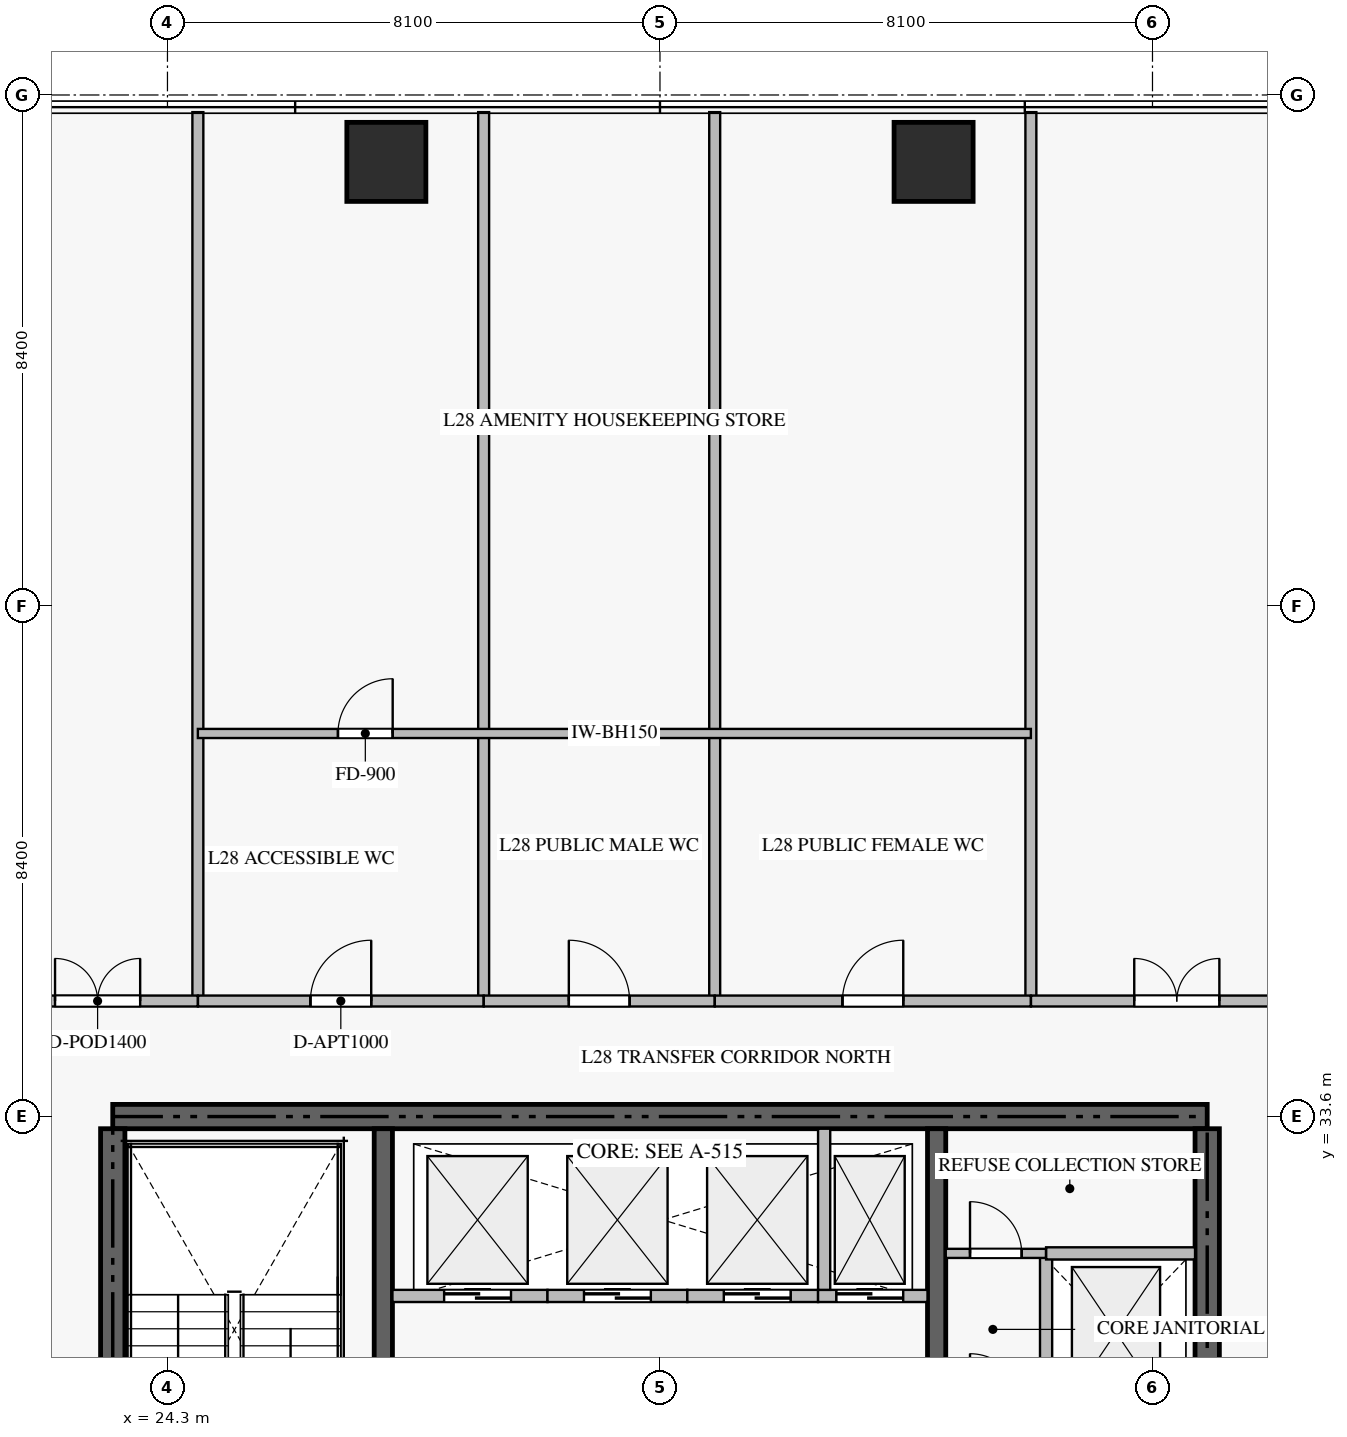
"""IFC4 building model, lengths in metres.
Left out: names, types, materials, properties, quantities, classifications, styles, units other than length and angle.
Written with IfcOpenShell. Run it as: python <this file> out.ifc"""

import sys

from ifc_helpers import new_model, si_unit, direction, frame, frame_2d, origin, origin_2d, place, context, subcontext, project, spatial, rectangle, extrude, source, transform, mapped, element, fill, save


model = new_model("IFC4")
c1 = context("Model", 3, precision=1e-05, world=origin(), true_north=direction((0.0, 1.0)))
c2 = subcontext(c1, "Body", "Model", "MODEL_VIEW")
j1 = project(units=[si_unit("LENGTHUNIT", "METRE"), si_unit("PLANEANGLEUNIT", "RADIAN")], contexts=[c1])
p1 = place(None, origin())
s1 = spatial("IfcSite", under=j1, at=p1, CompositionType="ELEMENT")
p2 = place(p1, origin())
s2 = spatial("IfcBuilding", under=s1, at=p2, CompositionType="ELEMENT")
p3 = place(p2, frame((0.0, 0.0, 115.2)))
s3 = spatial("IfcBuildingStorey", under=s2, at=p3, CompositionType="ELEMENT", Elevation=115.2)
p4 = place(p3, frame((41.4, 33.6, -0.36), z_axis=(0.0, 0.0, 1.0), x_axis=(-1.0, 0.0, 0.0)))
e1 = element("IfcWall", 1, at=p4, inside=s3, PredefinedType="SHEAR", context=c2, shape_type="SweptSolid", body=[
    extrude(rectangle(XDim=18.0, YDim=0.4, at=frame_2d((9.0, 0.0))), origin(), (0.0, 0.0, 1.0), 4.868),
])
p5 = place(p3, frame((23.4, 24.25, -0.36), z_axis=(0.0, 0.0, 1.0), x_axis=(0.0, 1.0, 0.0)))
e2 = element("IfcWall", 2, at=p5, inside=s3, PredefinedType="SHEAR", context=c2, shape_type="SweptSolid", body=[
    extrude(rectangle(XDim=9.15, YDim=0.4, at=frame_2d((4.575, 0.0))), origin(), (0.0, 0.0, 1.0), 4.868),
])
p6 = place(p3, frame((41.4, 27.75, -0.36), z_axis=(0.0, 0.0, 1.0), x_axis=(0.0, 1.0, 0.0)))
e3 = element("IfcWall", 3, at=p6, inside=s3, PredefinedType="SHEAR", context=c2, shape_type="SweptSolid", body=[
    extrude(rectangle(XDim=5.65, YDim=0.4, at=frame_2d((2.825, 0.0))), origin(), (0.0, 0.0, 1.0), 4.868),
])
p7 = place(p3, frame((27.85, 23.55, -0.36), z_axis=(0.0, 0.0, 1.0), x_axis=(0.0, 1.0, 0.0)))
e4 = element("IfcWall", 4, at=p7, inside=s3, PredefinedType="SHEAR", context=c2, shape_type="SweptSolid", body=[
    extrude(rectangle(XDim=9.85, YDim=0.3, at=frame_2d((4.925, 0.0))), origin(), (0.0, 0.0, 1.0), 4.868),
])
p8 = place(p3, frame((36.95, 27.05, -0.36), z_axis=(0.0, 0.0, 1.0), x_axis=(0.0, 1.0, 0.0)))
e5 = element("IfcWall", 5, at=p8, inside=s3, PredefinedType="SHEAR", context=c2, shape_type="SweptSolid", body=[
    extrude(rectangle(XDim=6.35, YDim=0.3, at=frame_2d((3.175, 0.0))), origin(), (0.0, 0.0, 1.0), 4.868),
])
m1 = source(origin(), c2, "Body", "SweptSolid", [
    extrude(rectangle(XDim=1.3, YDim=1.3, at=origin_2d()), origin(), (0.0, 0.0, 1.0), 4.87),
])
for number, where, z_axis, x_axis in (
    (6, (27.9, 49.3, -0.36), (0.0, 0.0, 1.0), (1.0, 0.0, 0.0)),
    (7, (36.9, 49.3, -0.36), (0.0, 0.0, 1.0), (1.0, 0.0, 0.0)),
):
    element("IfcColumn", number, at=place(p3, frame(where, z_axis=z_axis, x_axis=x_axis)), inside=s3, PredefinedType="COLUMN", context=c2, shape_type="MappedRepresentation", body=[
        mapped(m1, transform((0.0, 0.0, 0.0), scale=1.0)),
    ])
p9 = place(p3, frame((28.0, 30.65, 0.0), z_axis=(0.0, 0.0, 1.0), x_axis=(1.0, 0.0, 0.0)))
e8 = element("IfcWall", 8, at=p9, inside=s3, PredefinedType="STANDARD", context=c2, shape_type="SweptSolid", body=[
    extrude(rectangle(XDim=2.55, YDim=0.2, at=frame_2d((1.275, 0.0))), origin(), (0.0, 0.0, 1.0), 4.51),
])
p10 = place(p9, frame((0.85, 0.0, 0.0)))
e9 = element("IfcOpeningElement", 9, at=p10, cuts=e8, PredefinedType="OPENING", context=c2, shape_type="SweptSolid", body=[
    extrude(rectangle(XDim=1.1, YDim=2.2, at=frame_2d((0.55, 1.1))), frame((0.0, 0.11, 0.0), z_axis=(0.0, -1.0, 0.0), x_axis=(1.0, 0.0, 0.0)), (0.0, 0.0, 1.0), 0.22),
])
p11 = place(p3, frame((30.55, 30.65, 0.0), z_axis=(0.0, 0.0, 1.0), x_axis=(1.0, 0.0, 0.0)))
e10 = element("IfcWall", 10, at=p11, inside=s3, PredefinedType="STANDARD", context=c2, shape_type="SweptSolid", body=[
    extrude(rectangle(XDim=2.3, YDim=0.2, at=frame_2d((1.15, 0.0))), origin(), (0.0, 0.0, 1.0), 4.51),
])
p12 = place(p11, frame((0.6, 0.0, 0.0)))
e11 = element("IfcOpeningElement", 11, at=p12, cuts=e10, PredefinedType="OPENING", context=c2, shape_type="SweptSolid", body=[
    extrude(rectangle(XDim=1.1, YDim=2.2, at=frame_2d((0.55, 1.1))), frame((0.0, 0.11, 0.0), z_axis=(0.0, -1.0, 0.0), x_axis=(1.0, 0.0, 0.0)), (0.0, 0.0, 1.0), 0.22),
])
p13 = place(p3, frame((32.85, 30.65, 0.0), z_axis=(0.0, 0.0, 1.0), x_axis=(1.0, 0.0, 0.0)))
e12 = element("IfcWall", 12, at=p13, inside=s3, PredefinedType="STANDARD", context=c2, shape_type="SweptSolid", body=[
    extrude(rectangle(XDim=2.15, YDim=0.2, at=frame_2d((1.075, 0.0))), origin(), (0.0, 0.0, 1.0), 4.51),
])
p14 = place(p13, frame((0.6, 0.0, 0.0)))
e13 = element("IfcOpeningElement", 13, at=p14, cuts=e12, PredefinedType="OPENING", context=c2, shape_type="SweptSolid", body=[
    extrude(rectangle(XDim=1.1, YDim=2.2, at=frame_2d((0.55, 1.1))), frame((0.0, 0.11, 0.0), z_axis=(0.0, -1.0, 0.0), x_axis=(1.0, 0.0, 0.0)), (0.0, 0.0, 1.0), 0.22),
])
p15 = place(p3, frame((35.0, 30.65, 0.0), z_axis=(0.0, 0.0, 1.0), x_axis=(1.0, 0.0, 0.0)))
e14 = element("IfcWall", 14, at=p15, inside=s3, PredefinedType="STANDARD", context=c2, shape_type="SweptSolid", body=[
    extrude(rectangle(XDim=1.8, YDim=0.2, at=frame_2d((0.9, 0.0))), origin(), (0.0, 0.0, 1.0), 4.51),
])
p16 = place(p15, frame((0.3, 0.0, 0.0)))
e15 = element("IfcOpeningElement", 15, at=p16, cuts=e14, PredefinedType="OPENING", context=c2, shape_type="SweptSolid", body=[
    extrude(rectangle(XDim=1.1, YDim=2.2, at=frame_2d((0.55, 1.1))), frame((0.0, 0.11, 0.0), z_axis=(0.0, -1.0, 0.0), x_axis=(1.0, 0.0, 0.0)), (0.0, 0.0, 1.0), 0.22),
])
p17 = place(p3, frame((35.1, 30.75, 0.0), z_axis=(0.0, 0.0, 1.0), x_axis=(0.0, 1.0, 0.0)))
e16 = element("IfcWall", 16, at=p17, inside=s3, PredefinedType="STANDARD", context=c2, shape_type="SweptSolid", body=[
    extrude(rectangle(XDim=2.65, YDim=0.2, at=frame_2d((1.325, 0.0))), origin(), (0.0, 0.0, 1.0), 4.51),
])
p18 = place(p3, frame((38.75, 28.85, 0.0), z_axis=(0.0, 0.0, 1.0), x_axis=(0.0, 1.0, 0.0)))
e17 = element("IfcWall", 17, at=p18, inside=s3, PredefinedType="STANDARD", context=c2, shape_type="SweptSolid", body=[
    extrude(rectangle(XDim=2.5, YDim=0.2, at=frame_2d((1.25, 0.0))), origin(), (0.0, 0.0, 1.0), 4.51),
])
p19 = place(p3, frame((38.75, 31.35, 0.0), z_axis=(0.0, 0.0, 1.0), x_axis=(1.0, 0.0, 0.0)))
e18 = element("IfcWall", 18, at=p19, inside=s3, PredefinedType="STANDARD", context=c2, shape_type="SweptSolid", body=[
    extrude(rectangle(XDim=2.45, YDim=0.2, at=frame_2d((1.225, 0.0))), origin(), (0.0, 0.0, 1.0), 4.51),
])
p20 = place(p3, frame((37.1, 31.35, 0.0), z_axis=(0.0, 0.0, 1.0), x_axis=(1.0, 0.0, 0.0)))
e19 = element("IfcWall", 19, at=p20, inside=s3, PredefinedType="PARTITIONING", context=c2, shape_type="SweptSolid", body=[
    extrude(rectangle(XDim=1.648, YDim=0.15, at=frame_2d((0.824, 0.0))), origin(), (0.0, 0.0, 1.0), 4.51),
])
p21 = place(p20, frame((0.399, 0.0, 0.0)))
e20 = element("IfcOpeningElement", 20, at=p21, cuts=e19, PredefinedType="OPENING", context=c2, shape_type="SweptSolid", body=[
    extrude(rectangle(XDim=0.85, YDim=2.1, at=frame_2d((0.425, 1.05))), frame((0.0, 0.085, 0.0), z_axis=(0.0, -1.0, 0.0), x_axis=(1.0, 0.0, 0.0)), (0.0, 0.0, 1.0), 0.17),
])
for number, where, z_axis, x_axis in (
    (21, (24.8, 35.5, 0.0), (0.0, 0.0, 1.0), (0.0, 1.0, 0.0)),
    (22, (29.5, 35.5, 0.0), (0.0, 0.0, 1.0), (0.0, 1.0, 0.0)),
    (23, (33.3, 35.5, 0.0), (0.0, 0.0, 1.0), (0.0, 1.0, 0.0)),
    (24, (38.5, 35.5, 0.0), (0.0, 0.0, 1.0), (0.0, 1.0, 0.0)),
):
    element("IfcWall", number, at=place(p3, frame(where, z_axis=z_axis, x_axis=x_axis)), inside=s3, PredefinedType="PARTITIONING", context=c2, shape_type="SweptSolid", body=[
        extrude(rectangle(XDim=14.618, YDim=0.18, at=frame_2d((7.309, 0.0))), origin(), (0.0, 0.0, 1.0), 4.51),
    ])
p22 = place(p3, frame((21.502, 35.5, 0.0), z_axis=(0.0, 0.0, 1.0), x_axis=(1.0, 0.0, 0.0)))
e25 = element("IfcWall", 25, at=p22, inside=s3, PredefinedType="PARTITIONING", context=c2, shape_type="SweptSolid", body=[
    extrude(rectangle(XDim=3.298, YDim=0.18, at=frame_2d((1.649, 0.0))), origin(), (0.0, 0.0, 1.0), 4.51),
])
p23 = place(p22, frame((0.949, 0.0, 0.0)))
e26 = element("IfcOpeningElement", 26, at=p23, cuts=e25, PredefinedType="OPENING", context=c2, shape_type="SweptSolid", body=[
    extrude(rectangle(XDim=1.4, YDim=2.25, at=frame_2d((0.7, 1.125))), frame((0.0, 0.1, 0.0), z_axis=(0.0, -1.0, 0.0), x_axis=(1.0, 0.0, 0.0)), (0.0, 0.0, 1.0), 0.2),
])
p24 = place(p3, frame((24.802, 35.5, 0.0), z_axis=(0.0, 0.0, 1.0), x_axis=(1.0, 0.0, 0.0)))
e27 = element("IfcWall", 27, at=p24, inside=s3, PredefinedType="PARTITIONING", context=c2, shape_type="SweptSolid", body=[
    extrude(rectangle(XDim=4.698, YDim=0.18, at=frame_2d((2.349, 0.0))), origin(), (0.0, 0.0, 1.0), 4.51),
])
p25 = place(p24, frame((1.849, 0.0, 0.0)))
e28 = element("IfcOpeningElement", 28, at=p25, cuts=e27, PredefinedType="OPENING", context=c2, shape_type="SweptSolid", body=[
    extrude(rectangle(XDim=1.0, YDim=2.15, at=frame_2d((0.5, 1.075))), frame((0.0, 0.1, 0.0), z_axis=(0.0, -1.0, 0.0), x_axis=(1.0, 0.0, 0.0)), (0.0, 0.0, 1.0), 0.2),
])
p26 = place(p3, frame((29.502, 35.5, 0.0), z_axis=(0.0, 0.0, 1.0), x_axis=(1.0, 0.0, 0.0)))
e29 = element("IfcWall", 29, at=p26, inside=s3, PredefinedType="PARTITIONING", context=c2, shape_type="SweptSolid", body=[
    extrude(rectangle(XDim=3.798, YDim=0.18, at=frame_2d((1.899, 0.0))), origin(), (0.0, 0.0, 1.0), 4.51),
])
p27 = place(p26, frame((1.399, 0.0, 0.0)))
e30 = element("IfcOpeningElement", 30, at=p27, cuts=e29, PredefinedType="OPENING", context=c2, shape_type="SweptSolid", body=[
    extrude(rectangle(XDim=1.0, YDim=2.15, at=frame_2d((0.5, 1.075))), frame((0.0, 0.1, 0.0), z_axis=(0.0, -1.0, 0.0), x_axis=(1.0, 0.0, 0.0)), (0.0, 0.0, 1.0), 0.2),
])
p28 = place(p3, frame((33.302, 35.5, 0.0), z_axis=(0.0, 0.0, 1.0), x_axis=(1.0, 0.0, 0.0)))
e31 = element("IfcWall", 31, at=p28, inside=s3, PredefinedType="PARTITIONING", context=c2, shape_type="SweptSolid", body=[
    extrude(rectangle(XDim=5.198, YDim=0.18, at=frame_2d((2.599, 0.0))), origin(), (0.0, 0.0, 1.0), 4.51),
])
p29 = place(p28, frame((2.099, 0.0, 0.0)))
e32 = element("IfcOpeningElement", 32, at=p29, cuts=e31, PredefinedType="OPENING", context=c2, shape_type="SweptSolid", body=[
    extrude(rectangle(XDim=1.0, YDim=2.15, at=frame_2d((0.5, 1.075))), frame((0.0, 0.1, 0.0), z_axis=(0.0, -1.0, 0.0), x_axis=(1.0, 0.0, 0.0)), (0.0, 0.0, 1.0), 0.2),
])
p30 = place(p3, frame((38.502, 35.5, 0.0), z_axis=(0.0, 0.0, 1.0), x_axis=(1.0, 0.0, 0.0)))
e33 = element("IfcWall", 33, at=p30, inside=s3, PredefinedType="PARTITIONING", context=c2, shape_type="SweptSolid", body=[
    extrude(rectangle(XDim=4.796, YDim=0.18, at=frame_2d((2.398, 0.0))), origin(), (0.0, 0.0, 1.0), 4.51),
])
p31 = place(p30, frame((1.698, 0.0, 0.0)))
e34 = element("IfcOpeningElement", 34, at=p31, cuts=e33, PredefinedType="OPENING", context=c2, shape_type="SweptSolid", body=[
    extrude(rectangle(XDim=1.4, YDim=2.25, at=frame_2d((0.7, 1.125))), frame((0.0, 0.1, 0.0), z_axis=(0.0, -1.0, 0.0), x_axis=(1.0, 0.0, 0.0)), (0.0, 0.0, 1.0), 0.2),
])
p32 = place(p3, frame((24.8, 39.9, 0.0), z_axis=(0.0, 0.0, 1.0), x_axis=(1.0, 0.0, 0.0)))
e35 = element("IfcWall", 35, at=p32, inside=s3, PredefinedType="PARTITIONING", context=c2, shape_type="SweptSolid", body=[
    extrude(rectangle(XDim=13.7, YDim=0.15, at=frame_2d((6.85, 0.0))), origin(), (0.0, 0.0, 1.0), 4.51),
])
p33 = place(p32, frame((2.304, 0.0, 0.0)))
e36 = element("IfcOpeningElement", 36, at=p33, cuts=e35, PredefinedType="OPENING", context=c2, shape_type="SweptSolid", body=[
    extrude(rectangle(XDim=0.9, YDim=2.1, at=frame_2d((0.45, 1.05))), frame((0.0, 0.085, 0.0), z_axis=(0.0, -1.0, 0.0), x_axis=(1.0, 0.0, 0.0)), (0.0, 0.0, 1.0), 0.17),
])
m2 = source(origin(), c2, "Body", "SweptSolid", [
    extrude(rectangle(XDim=1.1, YDim=2.2, at=frame_2d((0.55, 1.1))), frame((0.0, 0.025, 0.0), z_axis=(0.0, -1.0, 0.0), x_axis=(1.0, 0.0, 0.0)), (0.0, 0.0, 1.0), 0.05),
])
p34 = place(p10, origin())
e37 = element("IfcDoor", 37, at=p34, inside=s3, OperationType="DOUBLE_DOOR_SLIDING", PredefinedType="DOOR", context=c2, shape_type="MappedRepresentation", body=[
    mapped(m2, transform((0.0, 0.0, 0.0), scale=1.0)),
])
fill(e9, e37)
p35 = place(p12, origin())
e38 = element("IfcDoor", 38, at=p35, inside=s3, OperationType="DOUBLE_DOOR_SLIDING", PredefinedType="DOOR", context=c2, shape_type="MappedRepresentation", body=[
    mapped(m2, transform((0.0, 0.0, 0.0), scale=1.0)),
])
fill(e11, e38)
p36 = place(p14, origin())
e39 = element("IfcDoor", 39, at=p36, inside=s3, OperationType="DOUBLE_DOOR_SLIDING", PredefinedType="DOOR", context=c2, shape_type="MappedRepresentation", body=[
    mapped(m2, transform((0.0, 0.0, 0.0), scale=1.0)),
])
fill(e13, e39)
p37 = place(p16, origin())
e40 = element("IfcDoor", 40, at=p37, inside=s3, OperationType="DOUBLE_DOOR_SLIDING", PredefinedType="DOOR", context=c2, shape_type="MappedRepresentation", body=[
    mapped(m2, transform((0.0, 0.0, 0.0), scale=1.0)),
])
fill(e15, e40)
m3 = source(origin(), c2, "Body", "SweptSolid", [
    extrude(rectangle(XDim=0.85, YDim=2.1, at=frame_2d((0.425, 1.05))), frame((0.0, 0.025, 0.0), z_axis=(0.0, -1.0, 0.0), x_axis=(1.0, 0.0, 0.0)), (0.0, 0.0, 1.0), 0.05),
])
p38 = place(p21, origin())
e41 = element("IfcDoor", 41, at=p38, inside=s3, OperationType="SINGLE_SWING_LEFT", PredefinedType="DOOR", context=c2, shape_type="MappedRepresentation", body=[
    mapped(m3, transform((0.0, 0.0, 0.0), scale=1.0)),
])
fill(e20, e41)
m4 = source(origin(), c2, "Body", "SweptSolid", [
    extrude(rectangle(XDim=1.4, YDim=2.25, at=frame_2d((0.7, 1.125))), frame((0.0, 0.025, 0.0), z_axis=(0.0, -1.0, 0.0), x_axis=(1.0, 0.0, 0.0)), (0.0, 0.0, 1.0), 0.05),
])
p39 = place(p23, origin())
e42 = element("IfcDoor", 42, at=p39, inside=s3, OperationType="DOUBLE_DOOR_SINGLE_SWING", PredefinedType="DOOR", context=c2, shape_type="MappedRepresentation", body=[
    mapped(m4, transform((0.0, 0.0, 0.0), scale=1.0)),
])
fill(e26, e42)
m5 = source(origin(), c2, "Body", "SweptSolid", [
    extrude(rectangle(XDim=1.0, YDim=2.15, at=frame_2d((0.5, 1.075))), frame((0.0, 0.025, 0.0), z_axis=(0.0, -1.0, 0.0), x_axis=(1.0, 0.0, 0.0)), (0.0, 0.0, 1.0), 0.05),
])
p40 = place(p25, origin())
e43 = element("IfcDoor", 43, at=p40, inside=s3, OperationType="SINGLE_SWING_RIGHT", PredefinedType="DOOR", context=c2, shape_type="MappedRepresentation", body=[
    mapped(m5, transform((0.0, 0.0, 0.0), scale=1.0)),
])
fill(e28, e43)
p41 = place(p27, origin())
e44 = element("IfcDoor", 44, at=p41, inside=s3, OperationType="SINGLE_SWING_LEFT", PredefinedType="DOOR", context=c2, shape_type="MappedRepresentation", body=[
    mapped(m5, transform((0.0, 0.0, 0.0), scale=1.0)),
])
fill(e30, e44)
p42 = place(p29, origin())
e45 = element("IfcDoor", 45, at=p42, inside=s3, OperationType="SINGLE_SWING_RIGHT", PredefinedType="DOOR", context=c2, shape_type="MappedRepresentation", body=[
    mapped(m5, transform((0.0, 0.0, 0.0), scale=1.0)),
])
fill(e32, e45)
p43 = place(p31, origin())
e46 = element("IfcDoor", 46, at=p43, inside=s3, OperationType="DOUBLE_DOOR_SINGLE_SWING", PredefinedType="DOOR", context=c2, shape_type="MappedRepresentation", body=[
    mapped(m4, transform((0.0, 0.0, 0.0), scale=1.0)),
])
fill(e34, e46)
m6 = source(origin(), c2, "Body", "SweptSolid", [
    extrude(rectangle(XDim=0.9, YDim=2.1, at=frame_2d((0.45, 1.05))), frame((0.0, 0.025, 0.0), z_axis=(0.0, -1.0, 0.0), x_axis=(1.0, 0.0, 0.0)), (0.0, 0.0, 1.0), 0.05),
])
p44 = place(p33, origin())
e47 = element("IfcDoor", 47, at=p44, inside=s3, OperationType="SINGLE_SWING_RIGHT", PredefinedType="DOOR", context=c2, shape_type="MappedRepresentation", body=[
    mapped(m6, transform((0.0, 0.0, 0.0), scale=1.0)),
])
fill(e36, e47)
save(model, sys.argv[1])
